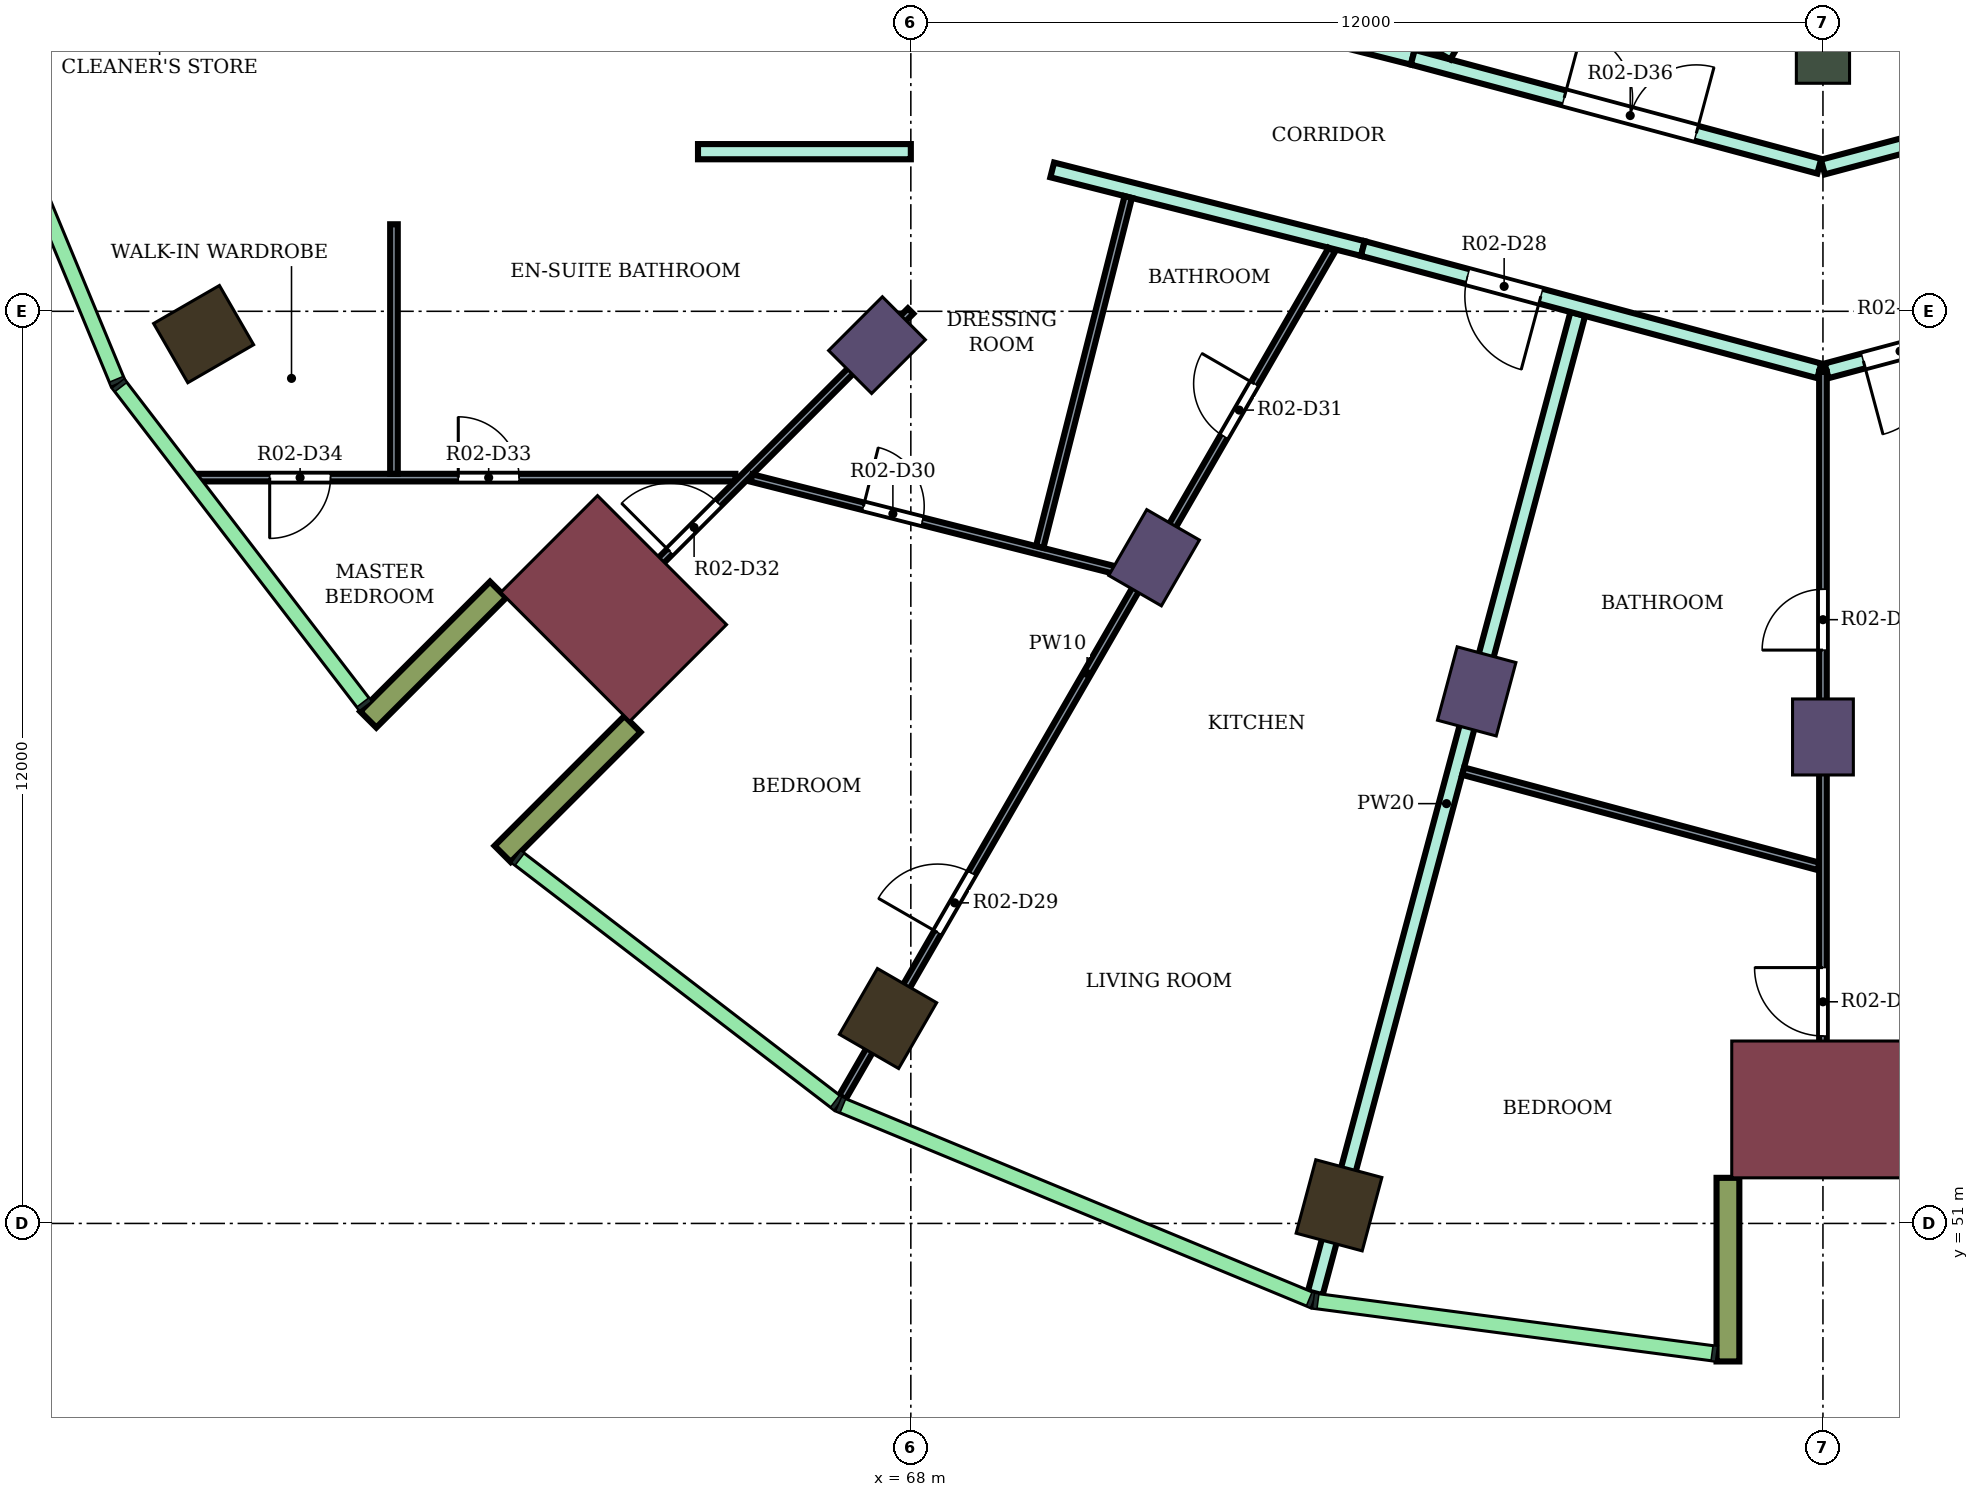
"""IFC4 building model, lengths in metres.
Left out: names, types, materials, properties, quantities, classifications, styles, units other than length and angle.
Written with IfcOpenShell. Run it as: python <this file> out.ifc"""

import sys

from ifc_helpers import new_model, si_unit, direction, frame, frame_2d, origin, origin_2d, place, context, subcontext, project, spatial, rectangle, extrude, element, fill, save


model = new_model("IFC4")
c1 = context("Model", 3, precision=1e-05, world=origin(), true_north=direction((0.0, 1.0)))
c2 = subcontext(c1, "Body", "Model", "MODEL_VIEW")
j1 = project(units=[si_unit("LENGTHUNIT", "METRE"), si_unit("PLANEANGLEUNIT", "RADIAN")], contexts=[c1])
p1 = place(None, origin())
s1 = spatial("IfcSite", under=j1, at=p1, CompositionType="ELEMENT")
p2 = place(p1, origin())
s2 = spatial("IfcBuilding", under=s1, at=p2, CompositionType="ELEMENT")
p3 = place(p2, frame((0.0, 0.0, 174.1)))
s3 = spatial("IfcBuildingStorey", under=s2, at=p3, CompositionType="ELEMENT", Elevation=174.1)
for number, where, z_axis, x_axis in (
    (1, (58.696, 62.7, 0.0), (0.0, 0.0, 1.0), (-0.866, -0.5, 0.0)),
    (2, (67.7, 53.696, 0.0), (0.0, 0.0, 1.0), (-0.5, -0.866, 0.0)),
    (3, (73.633, 51.238, 0.0), (0.0, 0.0, 1.0), (-0.259, -0.966, 0.0)),
):
    element("IfcColumn", number, at=place(p3, frame(where, z_axis=z_axis, x_axis=x_axis)), inside=s3, PredefinedType="COLUMN", context=c2, shape_type="SweptSolid", body=[
        extrude(rectangle(XDim=1.0, YDim=0.9, at=origin_2d()), origin(), (0.0, 0.0, 1.0), 4.1),
    ])
for number, where, z_axis, x_axis in (
    (4, (67.555, 62.555, 0.0), (0.0, 0.0, 1.0), (-0.707, -0.707, 0.0)),
    (5, (71.2, 59.758, 0.0), (0.0, 0.0, 1.0), (-0.5, -0.866, 0.0)),
    (6, (75.445, 58.0, 0.0), (0.0, 0.0, 1.0), (-0.259, -0.966, 0.0)),
    (7, (80.0, 57.4, 0.0), (0.0, 0.0, 1.0), (0.0, -1.0, 0.0)),
):
    element("IfcColumn", number, at=place(p3, frame(where, z_axis=z_axis, x_axis=x_axis)), inside=s3, PredefinedType="COLUMN", context=c2, shape_type="SweptSolid", body=[
        extrude(rectangle(XDim=1.0, YDim=0.8, at=origin_2d()), origin(), (0.0, 0.0, 1.0), 4.1),
    ])
p4 = place(p3, frame((80.0, 66.4, 0.0), z_axis=(0.0, 0.0, 1.0), x_axis=(0.0, -1.0, 0.0)))
e8 = element("IfcColumn", 8, at=p4, inside=s3, PredefinedType="COLUMN", context=c2, shape_type="SweptSolid", body=[
    extrude(rectangle(XDim=0.8, YDim=0.7, at=origin_2d()), origin(), (0.0, 0.0, 1.0), 4.1),
])
for number, where, z_axis, x_axis in (
    (9, (64.09, 59.09, 0.0), (0.0, 0.0, 1.0), (-0.707, -0.707, 0.0)),
    (10, (80.0, 52.5, 0.0), (0.0, 0.0, 1.0), (0.0, -1.0, 0.0)),
):
    element("IfcColumn", number, at=place(p3, frame(where, z_axis=z_axis, x_axis=x_axis)), inside=s3, PredefinedType="COLUMN", context=c2, shape_type="SweptSolid", body=[
        extrude(rectangle(XDim=1.8, YDim=2.4, at=origin_2d()), origin(), (0.0, 0.0, 1.0), 4.1),
    ])
for number, where, z_axis, x_axis in (
    (11, (62.57, 59.338, 0.0), (0.0, 0.0, 1.0), (-0.707, -0.707, 0.0)),
    (12, (64.338, 57.57, 0.0), (0.0, 0.0, 1.0), (-0.707, -0.707, 0.0)),
    (13, (78.75, 51.6, 0.0), (0.0, 0.0, 1.0), (0.0, -1.0, 0.0)),
):
    element("IfcWall", number, at=place(p3, frame(where, z_axis=z_axis, x_axis=x_axis)), inside=s3, PredefinedType="NOTDEFINED", context=c2, shape_type="SweptSolid", body=[
        extrude(rectangle(XDim=2.416, YDim=0.3, at=frame_2d((1.208, 0.0))), origin(), (0.0, 0.0, 1.0), 4.1),
    ])
p5 = place(p3, frame((65.2, 65.1, 0.0), z_axis=(0.0, 0.0, 1.0), x_axis=(1.0, 0.0, 0.0)))
e14 = element("IfcWall", 14, at=p5, inside=s3, PredefinedType="PARTITIONING", context=c2, shape_type="SweptSolid", body=[
    extrude(rectangle(XDim=2.8, YDim=0.2, at=frame_2d((1.4, 0.0))), origin(), (0.0, 0.0, 1.0), 3.65),
])
p6 = place(p3, frame((69.86, 64.86, 0.0), z_axis=(0.0, 0.0, 1.0), x_axis=(0.96942980222, -0.245368821506, 0.0)))
e15 = element("IfcWall", 15, at=p6, inside=s3, PredefinedType="PARTITIONING", context=c2, shape_type="SweptSolid", body=[
    extrude(rectangle(XDim=4.216, YDim=0.2, at=frame_2d((2.108, 0.0))), origin(), (0.0, 0.0, 1.0), 3.65),
])
p7 = place(p3, frame((72.1, 66.975, 0.0), z_axis=(0.0, 0.0, 1.0), x_axis=(0.969471314457, -0.245204752086, 0.0)))
e16 = element("IfcWall", 16, at=p7, inside=s3, PredefinedType="PARTITIONING", context=c2, shape_type="SweptSolid", body=[
    extrude(rectangle(XDim=2.582, YDim=0.2, at=frame_2d((1.291, 0.0))), origin(), (0.0, 0.0, 1.0), 3.65),
])
p8 = place(p7, frame((0.841, 0.0, 0.0)))
e17 = element("IfcOpeningElement", 17, at=p8, cuts=e16, PredefinedType="OPENING", context=c2, shape_type="SweptSolid", body=[
    extrude(rectangle(XDim=0.9, YDim=2.1, at=frame_2d((0.45, 1.05))), frame((0.0, 0.11, 0.0), z_axis=(0.0, -1.0, 0.0), x_axis=(1.0, 0.0, 0.0)), (0.0, 0.0, 1.0), 0.22),
])
p9 = place(p3, frame((73.321, 50.081, 0.0), z_axis=(0.0, 0.0, 1.0), x_axis=(0.258926994059, 0.965896894988, 0.0)))
e18 = element("IfcWall", 18, at=p9, inside=s3, PredefinedType="PARTITIONING", context=c2, shape_type="SweptSolid", body=[
    extrude(rectangle(XDim=13.338, YDim=0.2, at=frame_2d((6.669, 0.0))), origin(), (0.0, 0.0, 1.0), 3.65),
])
p10 = place(p3, frame((73.947, 63.826, 0.0), z_axis=(0.0, 0.0, 1.0), x_axis=(0.965908253407, -0.258884619088, 0.0)))
e19 = element("IfcWall", 19, at=p10, inside=s3, PredefinedType="PARTITIONING", context=c2, shape_type="SweptSolid", body=[
    extrude(rectangle(XDim=6.217, YDim=0.2, at=frame_2d((3.108, 0.0))), origin(), (0.0, 0.0, 1.0), 3.65),
])
p11 = place(p10, frame((1.424, 0.0, 0.0)))
e20 = element("IfcOpeningElement", 20, at=p11, cuts=e19, PredefinedType="OPENING", context=c2, shape_type="SweptSolid", body=[
    extrude(rectangle(XDim=1.0, YDim=2.1, at=frame_2d((0.5, 1.05))), frame((0.0, 0.11, 0.0), z_axis=(0.0, -1.0, 0.0), x_axis=(1.0, 0.0, 0.0)), (0.0, 0.0, 1.0), 0.22),
])
p12 = place(p3, frame((74.603, 66.342, 0.0), z_axis=(0.0, 0.0, 1.0), x_axis=(0.965895298152, -0.258932950796, 0.0)))
e21 = element("IfcWall", 21, at=p12, inside=s3, PredefinedType="PARTITIONING", context=c2, shape_type="SweptSolid", body=[
    extrude(rectangle(XDim=5.538, YDim=0.2, at=frame_2d((2.769, 0.0))), origin(), (0.0, 0.0, 1.0), 3.65),
])
p13 = place(p12, frame((2.062, 0.0, 0.0)))
e22 = element("IfcOpeningElement", 22, at=p13, cuts=e21, PredefinedType="OPENING", context=c2, shape_type="SweptSolid", body=[
    extrude(rectangle(XDim=1.8, YDim=2.1, at=frame_2d((0.9, 1.05))), frame((0.0, 0.11, 0.0), z_axis=(0.0, -1.0, 0.0), x_axis=(1.0, 0.0, 0.0)), (0.0, 0.0, 1.0), 0.22),
])
p14 = place(p3, frame((75.012, 66.363, 0.0), z_axis=(0.0, 0.0, 1.0), x_axis=(0.500168489725, 0.86592810434, 0.0)))
e23 = element("IfcWall", 23, at=p14, inside=s3, PredefinedType="PARTITIONING", context=c2, shape_type="SweptSolid", body=[
    extrude(rectangle(XDim=2.274, YDim=0.2, at=frame_2d((1.137, 0.0))), origin(), (0.0, 0.0, 1.0), 3.65),
])
p15 = place(p3, frame((80.0, 64.898, 0.0), z_axis=(0.0, 0.0, 1.0), x_axis=(0.966237419782, 0.257653349704, 0.0)))
e24 = element("IfcWall", 24, at=p15, inside=s3, PredefinedType="PARTITIONING", context=c2, shape_type="SweptSolid", body=[
    extrude(rectangle(XDim=8.169, YDim=0.2, at=frame_2d((4.084, 0.0))), origin(), (0.0, 0.0, 1.0), 3.65),
])
p16 = place(p15, frame((6.428, 0.0, 0.0)))
e25 = element("IfcOpeningElement", 25, at=p16, cuts=e24, PredefinedType="OPENING", context=c2, shape_type="SweptSolid", body=[
    extrude(rectangle(XDim=0.9, YDim=2.1, at=frame_2d((0.45, 1.05))), frame((0.0, 0.11, 0.0), z_axis=(0.0, -1.0, 0.0), x_axis=(1.0, 0.0, 0.0)), (0.0, 0.0, 1.0), 0.22),
])
p17 = place(p3, frame((80.048, 62.217, 0.0), z_axis=(0.0, 0.0, 1.0), x_axis=(0.965941520544, 0.258760466242, 0.0)))
e26 = element("IfcWall", 26, at=p17, inside=s3, PredefinedType="PARTITIONING", context=c2, shape_type="SweptSolid", body=[
    extrude(rectangle(XDim=6.006, YDim=0.2, at=frame_2d((3.003, 0.0))), origin(), (0.0, 0.0, 1.0), 3.65),
])
p18 = place(p17, frame((0.5, 0.0, 0.0)))
e27 = element("IfcOpeningElement", 27, at=p18, cuts=e26, PredefinedType="OPENING", context=c2, shape_type="SweptSolid", body=[
    extrude(rectangle(XDim=1.0, YDim=2.1, at=frame_2d((0.5, 1.05))), frame((0.0, 0.11, 0.0), z_axis=(0.0, -1.0, 0.0), x_axis=(1.0, 0.0, 0.0)), (0.0, 0.0, 1.0), 0.22),
])
p19 = place(p3, frame((58.6, 60.812, 0.0), z_axis=(0.0, 0.0, 1.0), x_axis=(1.0, 0.0, 0.0)))
e28 = element("IfcWall", 28, at=p19, inside=s3, PredefinedType="PARTITIONING", context=c2, shape_type="SweptSolid", body=[
    extrude(rectangle(XDim=7.092, YDim=0.1, at=frame_2d((3.546, 0.0))), origin(), (0.0, 0.0, 1.0), 3.65),
])
p20 = place(p19, frame((3.446, 0.0, 0.0)))
e29 = element("IfcOpeningElement", 29, at=p20, cuts=e28, PredefinedType="OPENING", context=c2, shape_type="SweptSolid", body=[
    extrude(rectangle(XDim=0.8, YDim=2.1, at=frame_2d((0.4, 1.05))), frame((0.0, 0.06, 0.0), z_axis=(0.0, -1.0, 0.0), x_axis=(1.0, 0.0, 0.0)), (0.0, 0.0, 1.0), 0.12),
])
p21 = place(p19, frame((0.965, 0.0, 0.0)))
e30 = element("IfcOpeningElement", 30, at=p21, cuts=e28, PredefinedType="OPENING", context=c2, shape_type="SweptSolid", body=[
    extrude(rectangle(XDim=0.8, YDim=2.1, at=frame_2d((0.4, 1.05))), frame((0.0, 0.06, 0.0), z_axis=(0.0, -1.0, 0.0), x_axis=(1.0, 0.0, 0.0)), (0.0, 0.0, 1.0), 0.12),
])
p22 = place(p3, frame((61.2, 60.862, 0.0), z_axis=(0.0, 0.0, 1.0), x_axis=(0.0, 1.0, 0.0)))
e31 = element("IfcWall", 31, at=p22, inside=s3, PredefinedType="PARTITIONING", context=c2, shape_type="SweptSolid", body=[
    extrude(rectangle(XDim=3.283, YDim=0.1, at=frame_2d((1.642, 0.0))), origin(), (0.0, 0.0, 1.0), 3.65),
])
p23 = place(p3, frame((63.591, 58.6, 0.0), z_axis=(0.0, 0.0, 1.0), x_axis=(0.707263550227, 0.706949977382, 0.0)))
e32 = element("IfcWall", 32, at=p23, inside=s3, PredefinedType="PARTITIONING", context=c2, shape_type="SweptSolid", body=[
    extrude(rectangle(XDim=6.229, YDim=0.1, at=frame_2d((3.114, 0.0))), origin(), (0.0, 0.0, 1.0), 3.65),
])
p24 = place(p23, frame((1.752, 0.0, 0.0)))
e33 = element("IfcOpeningElement", 33, at=p24, cuts=e32, PredefinedType="OPENING", context=c2, shape_type="SweptSolid", body=[
    extrude(rectangle(XDim=0.9, YDim=2.1, at=frame_2d((0.45, 1.05))), frame((0.0, 0.06, 0.0), z_axis=(0.0, -1.0, 0.0), x_axis=(1.0, 0.0, 0.0)), (0.0, 0.0, 1.0), 0.12),
])
p25 = place(p3, frame((65.904, 60.807, 0.0), z_axis=(0.0, 0.0, 1.0), x_axis=(0.969391307129, -0.245520861971, 0.0)))
e34 = element("IfcWall", 34, at=p25, inside=s3, PredefinedType="PARTITIONING", context=c2, shape_type="SweptSolid", body=[
    extrude(rectangle(XDim=5.251, YDim=0.1, at=frame_2d((2.625, 0.0))), origin(), (0.0, 0.0, 1.0), 3.65),
])
p26 = place(p25, frame((1.519, 0.0, 0.0)))
e35 = element("IfcOpeningElement", 35, at=p26, cuts=e34, PredefinedType="OPENING", context=c2, shape_type="SweptSolid", body=[
    extrude(rectangle(XDim=0.8, YDim=2.1, at=frame_2d((0.4, 1.05))), frame((0.0, 0.06, 0.0), z_axis=(0.0, -1.0, 0.0), x_axis=(1.0, 0.0, 0.0)), (0.0, 0.0, 1.0), 0.12),
])
p27 = place(p3, frame((67.1, 52.659, 0.0), z_axis=(0.0, 0.0, 1.0), x_axis=(0.500072574725, 0.865983498692, 0.0)))
e36 = element("IfcWall", 36, at=p27, inside=s3, PredefinedType="PARTITIONING", context=c2, shape_type="SweptSolid", body=[
    extrude(rectangle(XDim=12.876, YDim=0.1, at=frame_2d((6.438, 0.0))), origin(), (0.0, 0.0, 1.0), 3.65),
])
p28 = place(p27, frame((2.504, 0.0, 0.0)))
e37 = element("IfcOpeningElement", 37, at=p28, cuts=e36, PredefinedType="OPENING", context=c2, shape_type="SweptSolid", body=[
    extrude(rectangle(XDim=0.9, YDim=2.1, at=frame_2d((0.45, 1.05))), frame((0.0, 0.06, 0.0), z_axis=(0.0, -1.0, 0.0), x_axis=(1.0, 0.0, 0.0)), (0.0, 0.0, 1.0), 0.12),
])
p29 = place(p27, frame((10.04, 0.0, 0.0)))
e38 = element("IfcOpeningElement", 38, at=p29, cuts=e36, PredefinedType="OPENING", context=c2, shape_type="SweptSolid", body=[
    extrude(rectangle(XDim=0.8, YDim=2.1, at=frame_2d((0.4, 1.05))), frame((0.0, 0.06, 0.0), z_axis=(0.0, -1.0, 0.0), x_axis=(1.0, 0.0, 0.0)), (0.0, 0.0, 1.0), 0.12),
])
p30 = place(p3, frame((69.695, 59.899, 0.0), z_axis=(0.0, 0.0, 1.0), x_axis=(0.245292232594, 0.96944918414, 0.0)))
e39 = element("IfcWall", 39, at=p30, inside=s3, PredefinedType="PARTITIONING", context=c2, shape_type="SweptSolid", body=[
    extrude(rectangle(XDim=4.75, YDim=0.1, at=frame_2d((2.375, 0.0))), origin(), (0.0, 0.0, 1.0), 3.65),
])
p31 = place(p3, frame((75.267, 56.95, 0.0), z_axis=(0.0, 0.0, 1.0), x_axis=(0.965934541962, -0.258786515577, 0.0)))
e40 = element("IfcWall", 40, at=p31, inside=s3, PredefinedType="PARTITIONING", context=c2, shape_type="SweptSolid", body=[
    extrude(rectangle(XDim=4.84, YDim=0.1, at=frame_2d((2.42, 0.0))), origin(), (0.0, 0.0, 1.0), 3.65),
])
p32 = place(p3, frame((80.0, 51.8, 0.0), z_axis=(0.0, 0.0, 1.0), x_axis=(0.0, 1.0, 0.0)))
e41 = element("IfcWall", 41, at=p32, inside=s3, PredefinedType="PARTITIONING", context=c2, shape_type="SweptSolid", body=[
    extrude(rectangle(XDim=10.404, YDim=0.1, at=frame_2d((5.202, 0.0))), origin(), (0.0, 0.0, 1.0), 3.65),
])
p33 = place(p32, frame((1.666, 0.0, 0.0)))
e42 = element("IfcOpeningElement", 42, at=p33, cuts=e41, PredefinedType="OPENING", context=c2, shape_type="SweptSolid", body=[
    extrude(rectangle(XDim=0.9, YDim=2.1, at=frame_2d((0.45, 1.05))), frame((0.0, 0.06, 0.0), z_axis=(0.0, -1.0, 0.0), x_axis=(1.0, 0.0, 0.0)), (0.0, 0.0, 1.0), 0.12),
])
p34 = place(p32, frame((6.743, 0.0, 0.0)))
e43 = element("IfcOpeningElement", 43, at=p34, cuts=e41, PredefinedType="OPENING", context=c2, shape_type="SweptSolid", body=[
    extrude(rectangle(XDim=0.8, YDim=2.1, at=frame_2d((0.4, 1.05))), frame((0.0, 0.06, 0.0), z_axis=(0.0, -1.0, 0.0), x_axis=(1.0, 0.0, 0.0)), (0.0, 0.0, 1.0), 0.12),
])
p35 = place(p18, frame((1.0, 0.0, 0.0), z_axis=(0.0, 0.0, 1.0), x_axis=(-1.0, 0.0, 0.0)))
e44 = element("IfcDoor", 44, at=p35, inside=s3, OperationType="SINGLE_SWING_RIGHT", PredefinedType="DOOR", context=c2, shape_type="SweptSolid", body=[
    extrude(rectangle(XDim=1.0, YDim=2.1, at=frame_2d((0.5, 1.05))), frame((0.0, 0.025, 0.0), z_axis=(0.0, -1.0, 0.0), x_axis=(1.0, 0.0, 0.0)), (0.0, 0.0, 1.0), 0.05),
])
fill(e27, e44)
p36 = place(p33, origin())
e45 = element("IfcDoor", 45, at=p36, inside=s3, OperationType="SINGLE_SWING_RIGHT", PredefinedType="DOOR", context=c2, shape_type="SweptSolid", body=[
    extrude(rectangle(XDim=0.9, YDim=2.1, at=frame_2d((0.45, 1.05))), frame((0.0, 0.025, 0.0), z_axis=(0.0, -1.0, 0.0), x_axis=(1.0, 0.0, 0.0)), (0.0, 0.0, 1.0), 0.05),
])
fill(e42, e45)
p37 = place(p34, origin())
e46 = element("IfcDoor", 46, at=p37, inside=s3, OperationType="SINGLE_SWING_LEFT", PredefinedType="DOOR", context=c2, shape_type="SweptSolid", body=[
    extrude(rectangle(XDim=0.8, YDim=2.1, at=frame_2d((0.4, 1.05))), frame((0.0, 0.025, 0.0), z_axis=(0.0, -1.0, 0.0), x_axis=(1.0, 0.0, 0.0)), (0.0, 0.0, 1.0), 0.05),
])
fill(e43, e46)
p38 = place(p11, frame((1.0, 0.0, 0.0), z_axis=(0.0, 0.0, 1.0), x_axis=(-1.0, 0.0, 0.0)))
e47 = element("IfcDoor", 47, at=p38, inside=s3, OperationType="SINGLE_SWING_LEFT", PredefinedType="DOOR", context=c2, shape_type="SweptSolid", body=[
    extrude(rectangle(XDim=1.0, YDim=2.1, at=frame_2d((0.5, 1.05))), frame((0.0, 0.025, 0.0), z_axis=(0.0, -1.0, 0.0), x_axis=(1.0, 0.0, 0.0)), (0.0, 0.0, 1.0), 0.05),
])
fill(e20, e47)
p39 = place(p28, origin())
e48 = element("IfcDoor", 48, at=p39, inside=s3, OperationType="SINGLE_SWING_LEFT", PredefinedType="DOOR", context=c2, shape_type="SweptSolid", body=[
    extrude(rectangle(XDim=0.9, YDim=2.1, at=frame_2d((0.45, 1.05))), frame((0.0, 0.025, 0.0), z_axis=(0.0, -1.0, 0.0), x_axis=(1.0, 0.0, 0.0)), (0.0, 0.0, 1.0), 0.05),
])
fill(e37, e48)
p40 = place(p26, origin())
e49 = element("IfcDoor", 49, at=p40, inside=s3, OperationType="SINGLE_SWING_LEFT", PredefinedType="DOOR", context=c2, shape_type="SweptSolid", body=[
    extrude(rectangle(XDim=0.8, YDim=2.1, at=frame_2d((0.4, 1.05))), frame((0.0, 0.025, 0.0), z_axis=(0.0, -1.0, 0.0), x_axis=(1.0, 0.0, 0.0)), (0.0, 0.0, 1.0), 0.05),
])
fill(e35, e49)
p41 = place(p29, origin())
e50 = element("IfcDoor", 50, at=p41, inside=s3, OperationType="SINGLE_SWING_RIGHT", PredefinedType="DOOR", context=c2, shape_type="SweptSolid", body=[
    extrude(rectangle(XDim=0.8, YDim=2.1, at=frame_2d((0.4, 1.05))), frame((0.0, 0.025, 0.0), z_axis=(0.0, -1.0, 0.0), x_axis=(1.0, 0.0, 0.0)), (0.0, 0.0, 1.0), 0.05),
])
fill(e38, e50)
p42 = place(p24, origin())
e51 = element("IfcDoor", 51, at=p42, inside=s3, OperationType="SINGLE_SWING_LEFT", PredefinedType="DOOR", context=c2, shape_type="SweptSolid", body=[
    extrude(rectangle(XDim=0.9, YDim=2.1, at=frame_2d((0.45, 1.05))), frame((0.0, 0.025, 0.0), z_axis=(0.0, -1.0, 0.0), x_axis=(1.0, 0.0, 0.0)), (0.0, 0.0, 1.0), 0.05),
])
fill(e33, e51)
p43 = place(p20, origin())
e52 = element("IfcDoor", 52, at=p43, inside=s3, OperationType="SINGLE_SWING_LEFT", PredefinedType="DOOR", context=c2, shape_type="SweptSolid", body=[
    extrude(rectangle(XDim=0.8, YDim=2.1, at=frame_2d((0.4, 1.05))), frame((0.0, 0.025, 0.0), z_axis=(0.0, -1.0, 0.0), x_axis=(1.0, 0.0, 0.0)), (0.0, 0.0, 1.0), 0.05),
])
fill(e29, e52)
p44 = place(p21, frame((0.8, 0.0, 0.0), z_axis=(0.0, 0.0, 1.0), x_axis=(-1.0, 0.0, 0.0)))
e53 = element("IfcDoor", 53, at=p44, inside=s3, OperationType="SINGLE_SWING_RIGHT", PredefinedType="DOOR", context=c2, shape_type="SweptSolid", body=[
    extrude(rectangle(XDim=0.8, YDim=2.1, at=frame_2d((0.4, 1.05))), frame((0.0, 0.025, 0.0), z_axis=(0.0, -1.0, 0.0), x_axis=(1.0, 0.0, 0.0)), (0.0, 0.0, 1.0), 0.05),
])
fill(e30, e53)
p45 = place(p13, origin())
e54 = element("IfcDoor", 54, at=p45, inside=s3, OperationType="DOUBLE_DOOR_SINGLE_SWING", PredefinedType="DOOR", context=c2, shape_type="SweptSolid", body=[
    extrude(rectangle(XDim=1.8, YDim=2.1, at=frame_2d((0.9, 1.05))), frame((0.0, 0.025, 0.0), z_axis=(0.0, -1.0, 0.0), x_axis=(1.0, 0.0, 0.0)), (0.0, 0.0, 1.0), 0.05),
])
fill(e22, e54)
save(model, sys.argv[1])
